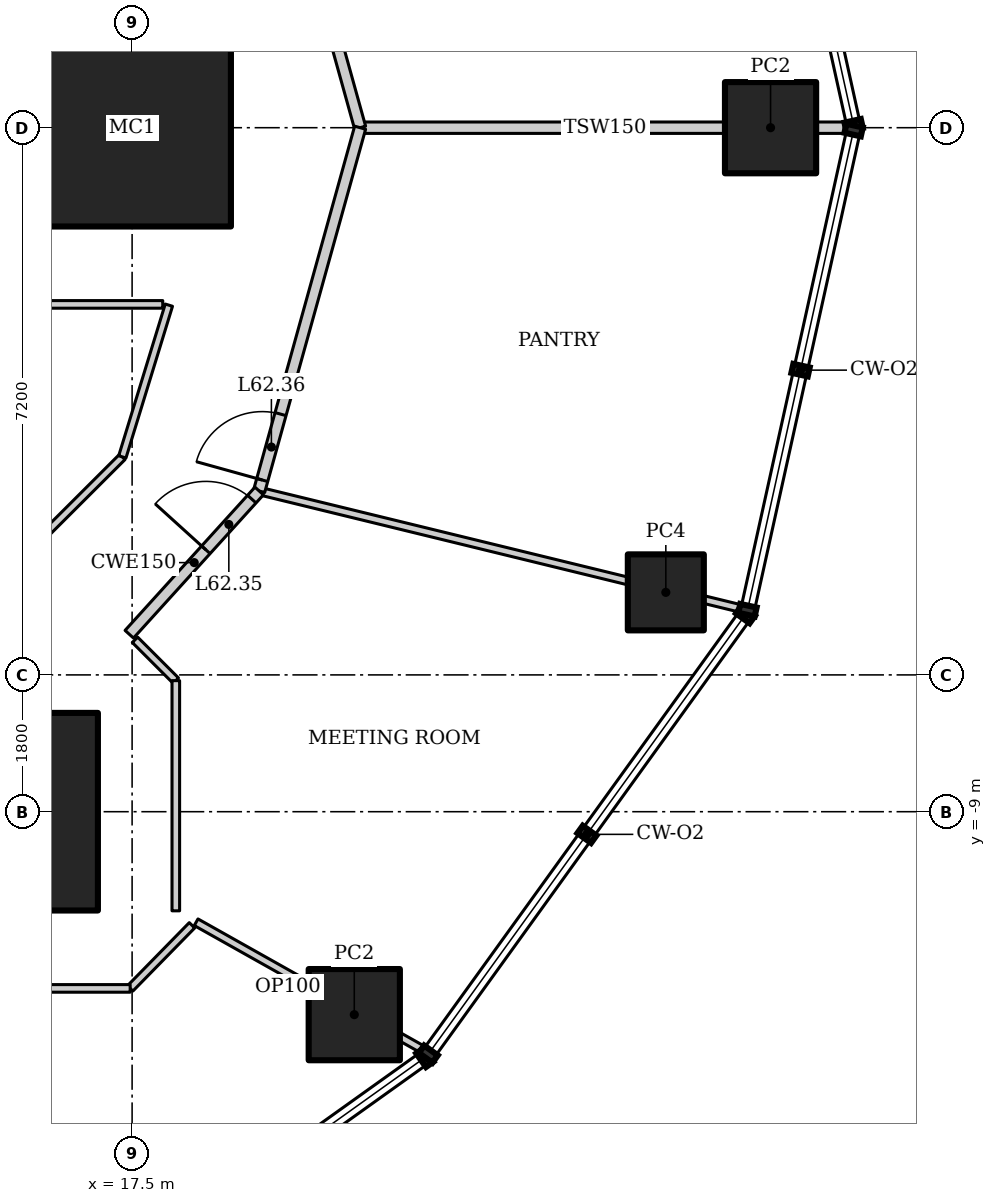
"""IFC4 building model, lengths in metres.
Left out: names, types, materials, properties, quantities, classifications, styles, units other than length and angle.
Written with IfcOpenShell. Run it as: python <this file> out.ifc"""

import sys

from ifc_helpers import new_model, si_unit, direction, frame, frame_2d, origin, origin_2d, place, context, subcontext, project, spatial, rectangle, hollow_rectangle, extrude, element, fill, save


model = new_model("IFC4")
c1 = context("Model", 3, precision=1e-05, world=origin(), true_north=direction((0.0, 1.0)))
c2 = subcontext(c1, "Body", "Model", "MODEL_VIEW")
j1 = project(units=[si_unit("LENGTHUNIT", "METRE"), si_unit("PLANEANGLEUNIT", "RADIAN")], contexts=[c1])
p1 = place(None, origin())
s1 = spatial("IfcSite", under=j1, at=p1, CompositionType="ELEMENT")
p2 = place(p1, origin())
s2 = spatial("IfcBuilding", under=s1, at=p2, CompositionType="ELEMENT")
p3 = place(p2, frame((0.0, 0.0, 266.2)))
s3 = spatial("IfcBuildingStorey", under=s2, at=p3, CompositionType="ELEMENT", Elevation=266.2)
for number, where, z_axis, x_axis in (
    (1, (17.5, 0.0, 0.0), (0.0, 0.0, 1.0), (1.0, 0.0, 0.0)),
    (2, (15.75, -9.0, 0.0), (0.0, 0.0, 1.0), (1.0, 0.0, 0.0)),
):
    element("IfcColumn", number, at=place(p3, frame(where, z_axis=z_axis, x_axis=x_axis)), inside=s3, PredefinedType="COLUMN", context=c2, shape_type="SweptSolid", body=[
        extrude(hollow_rectangle(XDim=2.6, YDim=2.6, WallThickness=0.13, at=origin_2d()), origin(), (0.0, 0.0, 1.0), 4.2),
    ])
p4 = place(p3, frame((25.9, 0.0, 0.0), z_axis=(-0.429918375723, 0.0, 0.902867758986), x_axis=(0.0, -1.0, 0.0)))
e3 = element("IfcColumn", 3, at=p4, inside=s3, PredefinedType="COLUMN", context=c2, shape_type="SweptSolid", body=[
    extrude(hollow_rectangle(XDim=1.2, YDim=1.2, WallThickness=0.1, at=origin_2d()), origin(), (0.0, 0.0, 1.0), 4.363),
])
p5 = place(p3, frame((20.423, -11.67, 0.0), z_axis=(-0.310472199469, 0.177420864126, 0.933878391617), x_axis=(-0.496156180016, -0.868233289521, 0.0)))
e4 = element("IfcColumn", 4, at=p5, inside=s3, PredefinedType="COLUMN", context=c2, shape_type="SweptSolid", body=[
    extrude(hollow_rectangle(XDim=1.2, YDim=1.2, WallThickness=0.1, at=origin_2d()), origin(), (0.0, 0.0, 1.0), 4.264),
])
p6 = place(p3, frame((24.522, -6.114, 0.0), z_axis=(-0.398362767155, 0.099325785847, 0.911834137336), x_axis=(-0.241928299692, -0.970294129534, 0.0)))
e5 = element("IfcColumn", 5, at=p6, inside=s3, PredefinedType="COLUMN", context=c2, shape_type="SweptSolid", body=[
    extrude(hollow_rectangle(XDim=1.0, YDim=1.0, WallThickness=0.08, at=origin_2d()), origin(), (0.0, 0.0, 1.0), 4.378),
])
p7 = place(p3, frame((26.944, 0.0, 0.0), z_axis=(0.0, 0.0, 1.0), x_axis=(-1.0, 0.0, 0.0)))
e6 = element("IfcWall", 6, at=p7, inside=s3, PredefinedType="PARTITIONING", context=c2, shape_type="SweptSolid", body=[
    extrude(rectangle(XDim=6.444, YDim=0.15, at=frame_2d((3.222, 0.0))), origin(), (0.0, 0.0, 1.0), 3.438),
])
p8 = place(p3, frame((25.543, -6.335, 0.0), z_axis=(0.0, 0.0, 1.0), x_axis=(-0.971467850621, 0.237171278215, 0.0)))
e7 = element("IfcWall", 7, at=p8, inside=s3, PredefinedType="PARTITIONING", context=c2, shape_type="SweptSolid", body=[
    extrude(rectangle(XDim=6.558, YDim=0.1, at=frame_2d((3.279, 0.0))), origin(), (0.0, 0.0, 1.0), 3.128),
])
p9 = place(p3, frame((20.5, 0.0, 0.0), z_axis=(0.0, 0.0, 1.0), x_axis=(-0.26770731566, 0.963500281859, 0.0)))
e8 = element("IfcWall", 8, at=p9, inside=s3, PredefinedType="PARTITIONING", context=c2, shape_type="SweptSolid", body=[
    extrude(rectangle(XDim=4.961, YDim=0.15, at=frame_2d((2.48, 0.0))), origin(), (0.0, 0.0, 1.0), 4.05),
])
p10 = place(p3, frame((19.172, -4.78, 0.0), z_axis=(0.0, 0.0, 1.0), x_axis=(0.26770731566, 0.963500281859, 0.0)))
e9 = element("IfcWall", 9, at=p10, inside=s3, PredefinedType="PARTITIONING", context=c2, shape_type="SweptSolid", body=[
    extrude(rectangle(XDim=4.961, YDim=0.15, at=frame_2d((2.48, 0.0))), origin(), (0.0, 0.0, 1.0), 4.05),
])
p11 = place(p10, frame((0.15, 0.0, 0.0)))
e10 = element("IfcOpeningElement", 10, at=p11, cuts=e9, PredefinedType="OPENING", context=c2, shape_type="SweptSolid", body=[
    extrude(rectangle(XDim=0.9, YDim=2.1, at=frame_2d((0.45, 1.05))), frame((0.0, 0.085, 0.0), z_axis=(0.0, -1.0, 0.0), x_axis=(1.0, 0.0, 0.0)), (0.0, 0.0, 1.0), 0.17),
])
p12 = place(p3, frame((21.358, -12.15, 0.0), z_axis=(0.0, 0.0, 1.0), x_axis=(-0.871730019583, 0.489986502832, 0.0)))
e11 = element("IfcWall", 11, at=p12, inside=s3, PredefinedType="PARTITIONING", context=c2, shape_type="SweptSolid", body=[
    extrude(rectangle(XDim=3.46, YDim=0.1, at=frame_2d((1.73, 0.0))), origin(), (0.0, 0.0, 1.0), 3.601),
])
p13 = place(p3, frame((17.463, -6.665, 0.0), z_axis=(0.0, 0.0, 1.0), x_axis=(0.671721890643, 0.74080341632, 0.0)))
e12 = element("IfcWall", 12, at=p13, inside=s3, PredefinedType="PARTITIONING", context=c2, shape_type="SweptSolid", body=[
    extrude(rectangle(XDim=2.544, YDim=0.15, at=frame_2d((1.272, 0.0))), origin(), (0.0, 0.0, 1.0), 4.05),
])
p14 = place(p13, frame((1.5, 0.0, 0.0)))
e13 = element("IfcOpeningElement", 13, at=p14, cuts=e12, PredefinedType="OPENING", context=c2, shape_type="SweptSolid", body=[
    extrude(rectangle(XDim=0.9, YDim=2.1, at=frame_2d((0.45, 1.05))), frame((0.0, 0.085, 0.0), z_axis=(0.0, -1.0, 0.0), x_axis=(1.0, 0.0, 0.0)), (0.0, 0.0, 1.0), 0.17),
])
p15 = place(p3, frame((17.372, -4.331, 0.0), z_axis=(0.0, 0.0, 1.0), x_axis=(-0.707587114823, -0.70662612104, 0.0)))
e14 = element("IfcWall", 14, at=p15, inside=s3, PredefinedType="PARTITIONING", context=c2, shape_type="SweptSolid", body=[
    extrude(rectangle(XDim=3.303, YDim=0.1, at=frame_2d((1.651, 0.0))), origin(), (0.0, 0.0, 1.0), 4.05),
])
p16 = place(p3, frame((18.288, -10.495, 0.0), z_axis=(0.0, 0.0, 1.0), x_axis=(-0.699823580681, -0.714315725659, 0.0)))
e15 = element("IfcWall", 15, at=p16, inside=s3, PredefinedType="PARTITIONING", context=c2, shape_type="SweptSolid", body=[
    extrude(rectangle(XDim=1.162, YDim=0.1, at=frame_2d((0.581, 0.0))), origin(), (0.0, 0.0, 1.0), 4.05),
])
p17 = place(p3, frame((17.475, -11.325, 0.0), z_axis=(0.0, 0.0, 1.0), x_axis=(-1.0, 0.0, 0.0)))
e16 = element("IfcWall", 16, at=p17, inside=s3, PredefinedType="PARTITIONING", context=c2, shape_type="SweptSolid", body=[
    extrude(rectangle(XDim=3.449, YDim=0.1, at=frame_2d((1.725, 0.0))), origin(), (0.0, 0.0, 1.0), 4.05),
])
p18 = place(p3, frame((17.538, -6.738, 0.0), z_axis=(0.0, 0.0, 1.0), x_axis=(0.707106781187, -0.707106781187, 0.0)))
e17 = element("IfcWall", 17, at=p18, inside=s3, PredefinedType="PARTITIONING", context=c2, shape_type="SweptSolid", body=[
    extrude(rectangle(XDim=0.76, YDim=0.1, at=frame_2d((0.38, 0.0))), origin(), (0.0, 0.0, 1.0), 4.05),
])
p19 = place(p3, frame((18.075, -7.275, 0.0), z_axis=(0.0, 0.0, 1.0), x_axis=(0.0, -1.0, 0.0)))
e18 = element("IfcWall", 18, at=p19, inside=s3, PredefinedType="PARTITIONING", context=c2, shape_type="SweptSolid", body=[
    extrude(rectangle(XDim=3.029, YDim=0.1, at=frame_2d((1.514, 0.0))), origin(), (0.0, 0.0, 1.0), 3.522),
])
p20 = place(p3, frame((17.984, -2.335, 0.0), z_axis=(0.0, 0.0, 1.0), x_axis=(-0.293231279211, -0.956041535129, 0.0)))
e19 = element("IfcWall", 19, at=p20, inside=s3, PredefinedType="PARTITIONING", context=c2, shape_type="SweptSolid", body=[
    extrude(rectangle(XDim=2.088, YDim=0.1, at=frame_2d((1.044, 0.0))), origin(), (0.0, 0.0, 1.0), 4.05),
])
p21 = place(p3, frame((17.903, -2.325, 0.0), z_axis=(0.0, 0.0, 1.0), x_axis=(-1.0, 0.0, 0.0)))
e20 = element("IfcWall", 20, at=p21, inside=s3, PredefinedType="PARTITIONING", context=c2, shape_type="SweptSolid", body=[
    extrude(rectangle(XDim=2.128, YDim=0.1, at=frame_2d((1.064, 0.0))), origin(), (0.0, 0.0, 1.0), 4.05),
])
p22 = place(p14, origin())
e21 = element("IfcDoor", 21, at=p22, inside=s3, OperationType="SINGLE_SWING_LEFT", PredefinedType="DOOR", context=c2, shape_type="SweptSolid", body=[
    extrude(rectangle(XDim=0.9, YDim=2.1, at=frame_2d((0.45, 1.05))), frame((0.0, 0.025, 0.0), z_axis=(0.0, -1.0, 0.0), x_axis=(1.0, 0.0, 0.0)), (0.0, 0.0, 1.0), 0.05),
])
fill(e13, e21)
p23 = place(p11, origin())
e22 = element("IfcDoor", 22, at=p23, inside=s3, OperationType="SINGLE_SWING_LEFT", PredefinedType="DOOR", context=c2, shape_type="SweptSolid", body=[
    extrude(rectangle(XDim=0.9, YDim=2.1, at=frame_2d((0.45, 1.05))), frame((0.0, 0.025, 0.0), z_axis=(0.0, -1.0, 0.0), x_axis=(1.0, 0.0, 0.0)), (0.0, 0.0, 1.0), 0.05),
])
fill(e10, e22)
save(model, sys.argv[1])
